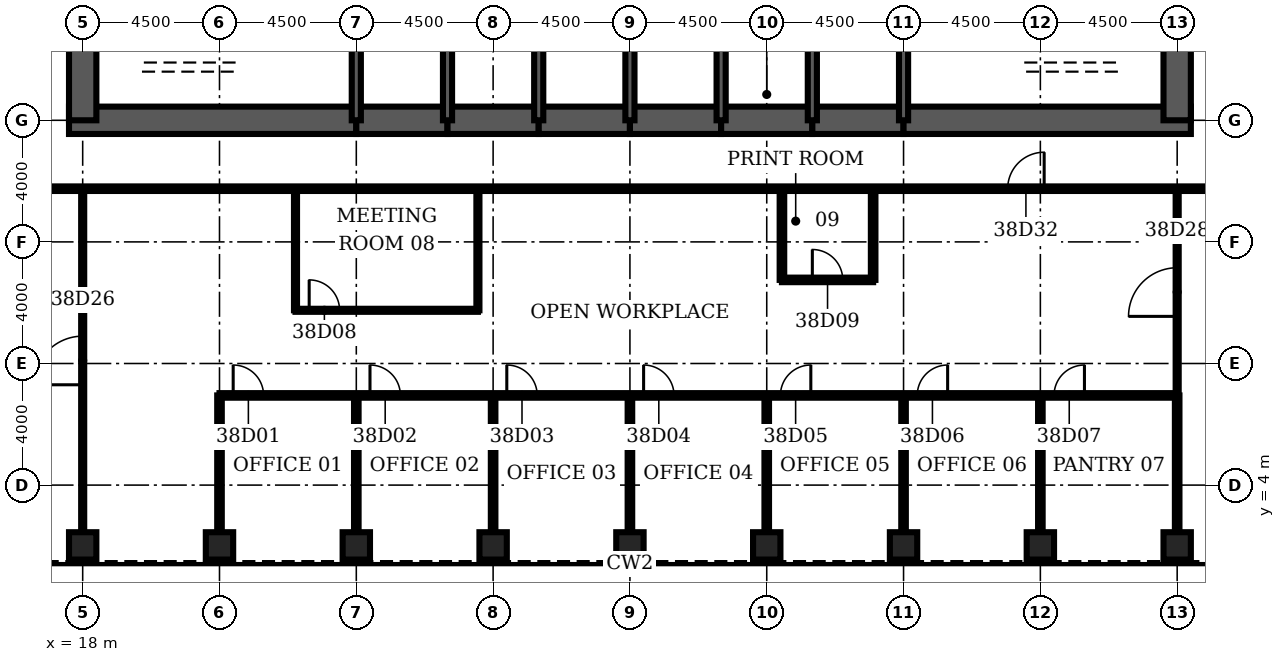
"""IFC4 building model, lengths in metres.
Left out: names, types, materials, properties, quantities, classifications, styles, units other than length and angle.
Written with IfcOpenShell. Run it as: python <this file> out.ifc"""

import sys

from ifc_helpers import new_model, si_unit, direction, frame, frame_2d, origin, origin_2d, place, context, subcontext, project, spatial, rectangle, hollow_rectangle, extrude, element, fill, save


model = new_model("IFC4")
c1 = context("Model", 3, precision=1e-05, world=origin(), true_north=direction((0.0, 1.0)))
c2 = subcontext(c1, "Body", "Model", "MODEL_VIEW")
j1 = project(units=[si_unit("LENGTHUNIT", "METRE"), si_unit("PLANEANGLEUNIT", "RADIAN")], contexts=[c1])
p1 = place(None, origin())
s1 = spatial("IfcSite", under=j1, at=p1, CompositionType="ELEMENT")
p2 = place(p1, origin())
s2 = spatial("IfcBuilding", under=s1, at=p2, CompositionType="ELEMENT")
p3 = place(p2, frame((0.0, 0.0, 171.9)))
s3 = spatial("IfcBuildingStorey", under=s2, at=p3, CompositionType="ELEMENT", Elevation=171.9)
for number, where, z_axis, x_axis in (
    (1, (18.0, 2.0, 0.0), (0.0, 0.0, 1.0), (0.0, 1.0, 0.0)),
    (2, (22.5, 2.0, 0.0), (0.0, 0.0, 1.0), (0.0, 1.0, 0.0)),
    (3, (27.0, 2.0, 0.0), (0.0, 0.0, 1.0), (0.0, 1.0, 0.0)),
    (4, (31.5, 2.0, 0.0), (0.0, 0.0, 1.0), (0.0, 1.0, 0.0)),
    (5, (36.0, 2.0, 0.0), (0.0, 0.0, 1.0), (0.0, 1.0, 0.0)),
    (6, (40.5, 2.0, 0.0), (0.0, 0.0, 1.0), (0.0, 1.0, 0.0)),
    (7, (45.0, 2.0, 0.0), (0.0, 0.0, 1.0), (0.0, 1.0, 0.0)),
    (8, (49.5, 2.0, 0.0), (0.0, 0.0, 1.0), (0.0, 1.0, 0.0)),
    (9, (54.0, 2.0, 0.0), (0.0, 0.0, 1.0), (0.0, 1.0, 0.0)),
):
    element("IfcColumn", number, at=place(p3, frame(where, z_axis=z_axis, x_axis=x_axis)), inside=s3, PredefinedType="COLUMN", context=c2, shape_type="SweptSolid", body=[
        extrude(hollow_rectangle(XDim=0.9, YDim=0.9, WallThickness=0.09, at=origin_2d()), origin(), (0.0, 0.0, 1.0), 4.2),
    ])
p4 = place(p3, frame((17.55, 16.0, 0.0), z_axis=(0.0, 0.0, 1.0), x_axis=(1.0, 0.0, 0.0)))
e10 = element("IfcWall", 10, at=p4, inside=s3, PredefinedType="SHEAR", context=c2, shape_type="SweptSolid", body=[
    extrude(rectangle(XDim=9.45, YDim=0.9, at=frame_2d((4.725, 0.0))), origin(), (0.0, 0.0, 1.0), 4.2),
])
for number, where, z_axis, x_axis in (
    (11, (27.0, 16.0, 0.0), (0.0, 0.0, 1.0), (1.0, 0.0, 0.0)),
    (12, (30.0, 16.0, 0.0), (0.0, 0.0, 1.0), (1.0, 0.0, 0.0)),
    (13, (33.0, 16.0, 0.0), (0.0, 0.0, 1.0), (1.0, 0.0, 0.0)),
    (14, (36.0, 16.0, 0.0), (0.0, 0.0, 1.0), (1.0, 0.0, 0.0)),
    (15, (39.0, 16.0, 0.0), (0.0, 0.0, 1.0), (1.0, 0.0, 0.0)),
    (16, (42.0, 16.0, 0.0), (0.0, 0.0, 1.0), (1.0, 0.0, 0.0)),
):
    element("IfcWall", number, at=place(p3, frame(where, z_axis=z_axis, x_axis=x_axis)), inside=s3, PredefinedType="SHEAR", context=c2, shape_type="SweptSolid", body=[
        extrude(rectangle(XDim=3.0, YDim=0.9, at=frame_2d((1.5, 0.0))), origin(), (0.0, 0.0, 1.0), 4.2),
    ])
p5 = place(p3, frame((45.0, 16.0, 0.0), z_axis=(0.0, 0.0, 1.0), x_axis=(1.0, 0.0, 0.0)))
e17 = element("IfcWall", 17, at=p5, inside=s3, PredefinedType="SHEAR", context=c2, shape_type="SweptSolid", body=[
    extrude(rectangle(XDim=9.45, YDim=0.9, at=frame_2d((4.725, 0.0))), origin(), (0.0, 0.0, 1.0), 4.2),
])
for number, where, z_axis, x_axis in (
    (18, (18.0, 19.2, 0.0), (0.0, 0.0, 1.0), (0.0, -1.0, 0.0)),
    (19, (54.0, 16.0, 0.0), (0.0, 0.0, 1.0), (0.0, 1.0, 0.0)),
):
    element("IfcWall", number, at=place(p3, frame(where, z_axis=z_axis, x_axis=x_axis)), inside=s3, PredefinedType="SHEAR", context=c2, shape_type="SweptSolid", body=[
        extrude(rectangle(XDim=3.2, YDim=0.9, at=frame_2d((1.6, 0.0))), origin(), (0.0, 0.0, 1.0), 4.2),
    ])
for number, where, z_axis, x_axis in (
    (20, (27.0, 16.0, 0.0), (0.0, 0.0, 1.0), (0.0, 1.0, 0.0)),
    (21, (30.0, 16.0, 0.0), (0.0, 0.0, 1.0), (0.0, 1.0, 0.0)),
    (22, (33.0, 16.0, 0.0), (0.0, 0.0, 1.0), (0.0, 1.0, 0.0)),
    (23, (36.0, 16.0, 0.0), (0.0, 0.0, 1.0), (0.0, 1.0, 0.0)),
    (24, (39.0, 16.0, 0.0), (0.0, 0.0, 1.0), (0.0, 1.0, 0.0)),
    (25, (42.0, 16.0, 0.0), (0.0, 0.0, 1.0), (0.0, 1.0, 0.0)),
    (26, (45.0, 16.0, 0.0), (0.0, 0.0, 1.0), (0.0, 1.0, 0.0)),
):
    element("IfcWall", number, at=place(p3, frame(where, z_axis=z_axis, x_axis=x_axis)), inside=s3, PredefinedType="SOLIDWALL", context=c2, shape_type="SweptSolid", body=[
        extrude(rectangle(XDim=3.2, YDim=0.3, at=frame_2d((1.6, 0.0))), origin(), (0.0, 0.0, 1.0), 4.2),
    ])
p6 = place(p3, frame((39.15, 17.4, 0.0), z_axis=(0.0, 0.0, 1.0), x_axis=(1.0, 0.0, 0.0)))
e27 = element("IfcWall", 27, at=p6, inside=s3, PredefinedType="SOLIDWALL", context=c2, shape_type="SweptSolid", body=[
    extrude(rectangle(XDim=2.7, YDim=0.3, at=frame_2d((1.35, 0.0))), origin(), (0.0, 0.0, 1.0), 4.04),
])
p7 = place(p6, frame((0.85, 0.0, 0.0)))
e28 = element("IfcOpeningElement", 28, at=p7, cuts=e27, PredefinedType="OPENING", context=c2, shape_type="SweptSolid", body=[
    extrude(rectangle(XDim=1.0, YDim=2.1, at=frame_2d((0.5, 1.05))), frame((0.0, 0.16, 0.0), z_axis=(0.0, -1.0, 0.0), x_axis=(1.0, 0.0, 0.0)), (0.0, 0.0, 1.0), 0.32),
])
p8 = place(p3, frame((22.5, 6.95, 0.0), z_axis=(0.0, 0.0, 1.0), x_axis=(1.0, 0.0, 0.0)))
e29 = element("IfcWall", 29, at=p8, inside=s3, PredefinedType="PARTITIONING", context=c2, shape_type="SweptSolid", body=[
    extrude(rectangle(XDim=31.5, YDim=0.15, at=frame_2d((15.75, 0.0))), origin(), (0.0, 0.0, 1.0), 3.0),
])
p9 = place(p8, frame((0.45, 0.0, 0.0)))
e30 = element("IfcOpeningElement", 30, at=p9, cuts=e29, PredefinedType="OPENING", context=c2, shape_type="SweptSolid", body=[
    extrude(rectangle(XDim=1.0, YDim=2.1, at=frame_2d((0.5, 1.05))), frame((0.0, 0.085, 0.0), z_axis=(0.0, -1.0, 0.0), x_axis=(1.0, 0.0, 0.0)), (0.0, 0.0, 1.0), 0.17),
])
p10 = place(p8, frame((4.95, 0.0, 0.0)))
e31 = element("IfcOpeningElement", 31, at=p10, cuts=e29, PredefinedType="OPENING", context=c2, shape_type="SweptSolid", body=[
    extrude(rectangle(XDim=1.0, YDim=2.1, at=frame_2d((0.5, 1.05))), frame((0.0, 0.085, 0.0), z_axis=(0.0, -1.0, 0.0), x_axis=(1.0, 0.0, 0.0)), (0.0, 0.0, 1.0), 0.17),
])
p11 = place(p8, frame((9.45, 0.0, 0.0)))
e32 = element("IfcOpeningElement", 32, at=p11, cuts=e29, PredefinedType="OPENING", context=c2, shape_type="SweptSolid", body=[
    extrude(rectangle(XDim=1.0, YDim=2.1, at=frame_2d((0.5, 1.05))), frame((0.0, 0.085, 0.0), z_axis=(0.0, -1.0, 0.0), x_axis=(1.0, 0.0, 0.0)), (0.0, 0.0, 1.0), 0.17),
])
p12 = place(p8, frame((13.95, 0.0, 0.0)))
e33 = element("IfcOpeningElement", 33, at=p12, cuts=e29, PredefinedType="OPENING", context=c2, shape_type="SweptSolid", body=[
    extrude(rectangle(XDim=1.0, YDim=2.1, at=frame_2d((0.5, 1.05))), frame((0.0, 0.085, 0.0), z_axis=(0.0, -1.0, 0.0), x_axis=(1.0, 0.0, 0.0)), (0.0, 0.0, 1.0), 0.17),
])
p13 = place(p8, frame((18.45, 0.0, 0.0)))
e34 = element("IfcOpeningElement", 34, at=p13, cuts=e29, PredefinedType="OPENING", context=c2, shape_type="SweptSolid", body=[
    extrude(rectangle(XDim=1.0, YDim=2.1, at=frame_2d((0.5, 1.05))), frame((0.0, 0.085, 0.0), z_axis=(0.0, -1.0, 0.0), x_axis=(1.0, 0.0, 0.0)), (0.0, 0.0, 1.0), 0.17),
])
p14 = place(p8, frame((22.95, 0.0, 0.0)))
e35 = element("IfcOpeningElement", 35, at=p14, cuts=e29, PredefinedType="OPENING", context=c2, shape_type="SweptSolid", body=[
    extrude(rectangle(XDim=1.0, YDim=2.1, at=frame_2d((0.5, 1.05))), frame((0.0, 0.085, 0.0), z_axis=(0.0, -1.0, 0.0), x_axis=(1.0, 0.0, 0.0)), (0.0, 0.0, 1.0), 0.17),
])
p15 = place(p8, frame((27.45, 0.0, 0.0)))
e36 = element("IfcOpeningElement", 36, at=p15, cuts=e29, PredefinedType="OPENING", context=c2, shape_type="SweptSolid", body=[
    extrude(rectangle(XDim=1.0, YDim=2.1, at=frame_2d((0.5, 1.05))), frame((0.0, 0.085, 0.0), z_axis=(0.0, -1.0, 0.0), x_axis=(1.0, 0.0, 0.0)), (0.0, 0.0, 1.0), 0.17),
])
p16 = place(p3, frame((25.0, 9.75, 0.0), z_axis=(0.0, 0.0, 1.0), x_axis=(1.0, 0.0, 0.0)))
e37 = element("IfcWall", 37, at=p16, inside=s3, PredefinedType="PARTITIONING", context=c2, shape_type="SweptSolid", body=[
    extrude(rectangle(XDim=6.0, YDim=0.1, at=frame_2d((3.0, 0.0))), origin(), (0.0, 0.0, 1.0), 3.0),
])
p17 = place(p16, frame((0.45, 0.0, 0.0)))
e38 = element("IfcOpeningElement", 38, at=p17, cuts=e37, PredefinedType="OPENING", context=c2, shape_type="SweptSolid", body=[
    extrude(rectangle(XDim=1.0, YDim=2.1, at=frame_2d((0.5, 1.05))), frame((0.0, 0.06, 0.0), z_axis=(0.0, -1.0, 0.0), x_axis=(1.0, 0.0, 0.0)), (0.0, 0.0, 1.0), 0.12),
])
p18 = place(p3, frame((41.0, 10.75, 0.0), z_axis=(0.0, 0.0, 1.0), x_axis=(1.0, 0.0, 0.0)))
e39 = element("IfcWall", 39, at=p18, inside=s3, PredefinedType="PARTITIONING", context=c2, shape_type="SweptSolid", body=[
    extrude(rectangle(XDim=3.0, YDim=0.15, at=frame_2d((1.5, 0.0))), origin(), (0.0, 0.0, 1.0), 3.0),
])
p19 = place(p18, frame((1.0, 0.0, 0.0)))
e40 = element("IfcOpeningElement", 40, at=p19, cuts=e39, PredefinedType="OPENING", context=c2, shape_type="SweptSolid", body=[
    extrude(rectangle(XDim=1.0, YDim=2.1, at=frame_2d((0.5, 1.05))), frame((0.0, 0.085, 0.0), z_axis=(0.0, -1.0, 0.0), x_axis=(1.0, 0.0, 0.0)), (0.0, 0.0, 1.0), 0.17),
])
p20 = place(p3, frame((15.15, 13.75, 0.0), z_axis=(0.0, 0.0, 1.0), x_axis=(1.0, 0.0, 0.0)))
e41 = element("IfcWall", 41, at=p20, inside=s3, PredefinedType="PARTITIONING", context=c2, shape_type="SweptSolid", body=[
    extrude(rectangle(XDim=41.7, YDim=0.15, at=frame_2d((20.85, 0.0))), origin(), (0.0, 0.0, 1.0), 3.0),
])
p21 = place(p20, frame((33.275, 0.0, 0.0)))
e42 = element("IfcOpeningElement", 42, at=p21, cuts=e41, PredefinedType="OPENING", context=c2, shape_type="SweptSolid", body=[
    extrude(rectangle(XDim=1.2, YDim=2.1, at=frame_2d((0.6, 1.05))), frame((0.0, 0.085, 0.0), z_axis=(0.0, -1.0, 0.0), x_axis=(1.0, 0.0, 0.0)), (0.0, 0.0, 1.0), 0.17),
])
p22 = place(p3, frame((18.0, 2.45, 0.0), z_axis=(0.0, 0.0, 1.0), x_axis=(0.0, 1.0, 0.0)))
e43 = element("IfcWall", 43, at=p22, inside=s3, PredefinedType="PARTITIONING", context=c2, shape_type="SweptSolid", body=[
    extrude(rectangle(XDim=11.3, YDim=0.1, at=frame_2d((5.65, 0.0))), origin(), (0.0, 0.0, 1.0), 3.0),
])
p23 = place(p22, frame((4.85, 0.0, 0.0)))
e44 = element("IfcOpeningElement", 44, at=p23, cuts=e43, PredefinedType="OPENING", context=c2, shape_type="SweptSolid", body=[
    extrude(rectangle(XDim=1.6, YDim=2.1, at=frame_2d((0.8, 1.05))), frame((0.0, 0.06, 0.0), z_axis=(0.0, -1.0, 0.0), x_axis=(1.0, 0.0, 0.0)), (0.0, 0.0, 1.0), 0.12),
])
p24 = place(p3, frame((22.5, 2.45, 0.0), z_axis=(0.0, 0.0, 1.0), x_axis=(0.0, 1.0, 0.0)))
e45 = element("IfcWall", 45, at=p24, inside=s3, PredefinedType="PARTITIONING", context=c2, shape_type="SweptSolid", body=[
    extrude(rectangle(XDim=4.5, YDim=0.15, at=frame_2d((2.25, 0.0))), origin(), (0.0, 0.0, 1.0), 3.0),
])
p25 = place(p3, frame((25.0, 9.75, 0.0), z_axis=(0.0, 0.0, 1.0), x_axis=(0.0, 1.0, 0.0)))
e46 = element("IfcWall", 46, at=p25, inside=s3, PredefinedType="PARTITIONING", context=c2, shape_type="SweptSolid", body=[
    extrude(rectangle(XDim=4.0, YDim=0.1, at=frame_2d((2.0, 0.0))), origin(), (0.0, 0.0, 1.0), 3.0),
])
p26 = place(p3, frame((27.0, 2.45, 0.0), z_axis=(0.0, 0.0, 1.0), x_axis=(0.0, 1.0, 0.0)))
e47 = element("IfcWall", 47, at=p26, inside=s3, PredefinedType="PARTITIONING", context=c2, shape_type="SweptSolid", body=[
    extrude(rectangle(XDim=4.5, YDim=0.15, at=frame_2d((2.25, 0.0))), origin(), (0.0, 0.0, 1.0), 3.0),
])
p27 = place(p3, frame((31.0, 9.75, 0.0), z_axis=(0.0, 0.0, 1.0), x_axis=(0.0, 1.0, 0.0)))
e48 = element("IfcWall", 48, at=p27, inside=s3, PredefinedType="PARTITIONING", context=c2, shape_type="SweptSolid", body=[
    extrude(rectangle(XDim=4.0, YDim=0.1, at=frame_2d((2.0, 0.0))), origin(), (0.0, 0.0, 1.0), 3.0),
])
for number, where, z_axis, x_axis in (
    (49, (31.5, 2.45, 0.0), (0.0, 0.0, 1.0), (0.0, 1.0, 0.0)),
    (50, (36.0, 2.45, 0.0), (0.0, 0.0, 1.0), (0.0, 1.0, 0.0)),
    (51, (40.5, 2.45, 0.0), (0.0, 0.0, 1.0), (0.0, 1.0, 0.0)),
):
    element("IfcWall", number, at=place(p3, frame(where, z_axis=z_axis, x_axis=x_axis)), inside=s3, PredefinedType="PARTITIONING", context=c2, shape_type="SweptSolid", body=[
        extrude(rectangle(XDim=4.5, YDim=0.15, at=frame_2d((2.25, 0.0))), origin(), (0.0, 0.0, 1.0), 3.0),
    ])
for number, where, z_axis, x_axis in (
    (52, (41.0, 10.75, 0.0), (0.0, 0.0, 1.0), (0.0, 1.0, 0.0)),
    (53, (44.0, 10.75, 0.0), (0.0, 0.0, 1.0), (0.0, 1.0, 0.0)),
):
    element("IfcWall", number, at=place(p3, frame(where, z_axis=z_axis, x_axis=x_axis)), inside=s3, PredefinedType="PARTITIONING", context=c2, shape_type="SweptSolid", body=[
        extrude(rectangle(XDim=3.0, YDim=0.15, at=frame_2d((1.5, 0.0))), origin(), (0.0, 0.0, 1.0), 3.0),
    ])
for number, where, z_axis, x_axis in (
    (54, (45.0, 2.45, 0.0), (0.0, 0.0, 1.0), (0.0, 1.0, 0.0)),
    (55, (49.5, 2.45, 0.0), (0.0, 0.0, 1.0), (0.0, 1.0, 0.0)),
    (56, (54.0, 2.45, 0.0), (0.0, 0.0, 1.0), (0.0, 1.0, 0.0)),
):
    element("IfcWall", number, at=place(p3, frame(where, z_axis=z_axis, x_axis=x_axis)), inside=s3, PredefinedType="PARTITIONING", context=c2, shape_type="SweptSolid", body=[
        extrude(rectangle(XDim=4.5, YDim=0.15, at=frame_2d((2.25, 0.0))), origin(), (0.0, 0.0, 1.0), 3.0),
    ])
p28 = place(p3, frame((54.0, 6.95, 0.0), z_axis=(0.0, 0.0, 1.0), x_axis=(0.0, 1.0, 0.0)))
e57 = element("IfcWall", 57, at=p28, inside=s3, PredefinedType="PARTITIONING", context=c2, shape_type="SweptSolid", body=[
    extrude(rectangle(XDim=6.8, YDim=0.1, at=frame_2d((3.4, 0.0))), origin(), (0.0, 0.0, 1.0), 3.0),
])
p29 = place(p28, frame((2.6, 0.0, 0.0)))
e58 = element("IfcOpeningElement", 58, at=p29, cuts=e57, PredefinedType="OPENING", context=c2, shape_type="SweptSolid", body=[
    extrude(rectangle(XDim=1.6, YDim=2.1, at=frame_2d((0.8, 1.05))), frame((0.0, 0.06, 0.0), z_axis=(0.0, -1.0, 0.0), x_axis=(1.0, 0.0, 0.0)), (0.0, 0.0, 1.0), 0.12),
])
p30 = place(p7, origin())
e59 = element("IfcDoor", 59, at=p30, inside=s3, OperationType="SINGLE_SWING_LEFT", PredefinedType="DOOR", context=c2, shape_type="SweptSolid", body=[
    extrude(rectangle(XDim=1.0, YDim=2.1, at=frame_2d((0.5, 1.05))), frame((0.0, 0.025, 0.0), z_axis=(0.0, -1.0, 0.0), x_axis=(1.0, 0.0, 0.0)), (0.0, 0.0, 1.0), 0.05),
])
fill(e28, e59)
p31 = place(p9, origin())
e60 = element("IfcDoor", 60, at=p31, inside=s3, OperationType="SINGLE_SWING_LEFT", PredefinedType="DOOR", context=c2, shape_type="SweptSolid", body=[
    extrude(rectangle(XDim=1.0, YDim=2.1, at=frame_2d((0.5, 1.05))), frame((0.0, 0.025, 0.0), z_axis=(0.0, -1.0, 0.0), x_axis=(1.0, 0.0, 0.0)), (0.0, 0.0, 1.0), 0.05),
])
fill(e30, e60)
p32 = place(p10, origin())
e61 = element("IfcDoor", 61, at=p32, inside=s3, OperationType="SINGLE_SWING_LEFT", PredefinedType="DOOR", context=c2, shape_type="SweptSolid", body=[
    extrude(rectangle(XDim=1.0, YDim=2.1, at=frame_2d((0.5, 1.05))), frame((0.0, 0.025, 0.0), z_axis=(0.0, -1.0, 0.0), x_axis=(1.0, 0.0, 0.0)), (0.0, 0.0, 1.0), 0.05),
])
fill(e31, e61)
p33 = place(p11, origin())
e62 = element("IfcDoor", 62, at=p33, inside=s3, OperationType="SINGLE_SWING_LEFT", PredefinedType="DOOR", context=c2, shape_type="SweptSolid", body=[
    extrude(rectangle(XDim=1.0, YDim=2.1, at=frame_2d((0.5, 1.05))), frame((0.0, 0.025, 0.0), z_axis=(0.0, -1.0, 0.0), x_axis=(1.0, 0.0, 0.0)), (0.0, 0.0, 1.0), 0.05),
])
fill(e32, e62)
p34 = place(p12, origin())
e63 = element("IfcDoor", 63, at=p34, inside=s3, OperationType="SINGLE_SWING_LEFT", PredefinedType="DOOR", context=c2, shape_type="SweptSolid", body=[
    extrude(rectangle(XDim=1.0, YDim=2.1, at=frame_2d((0.5, 1.05))), frame((0.0, 0.025, 0.0), z_axis=(0.0, -1.0, 0.0), x_axis=(1.0, 0.0, 0.0)), (0.0, 0.0, 1.0), 0.05),
])
fill(e33, e63)
p35 = place(p13, origin())
e64 = element("IfcDoor", 64, at=p35, inside=s3, OperationType="SINGLE_SWING_RIGHT", PredefinedType="DOOR", context=c2, shape_type="SweptSolid", body=[
    extrude(rectangle(XDim=1.0, YDim=2.1, at=frame_2d((0.5, 1.05))), frame((0.0, 0.025, 0.0), z_axis=(0.0, -1.0, 0.0), x_axis=(1.0, 0.0, 0.0)), (0.0, 0.0, 1.0), 0.05),
])
fill(e34, e64)
p36 = place(p14, origin())
e65 = element("IfcDoor", 65, at=p36, inside=s3, OperationType="SINGLE_SWING_RIGHT", PredefinedType="DOOR", context=c2, shape_type="SweptSolid", body=[
    extrude(rectangle(XDim=1.0, YDim=2.1, at=frame_2d((0.5, 1.05))), frame((0.0, 0.025, 0.0), z_axis=(0.0, -1.0, 0.0), x_axis=(1.0, 0.0, 0.0)), (0.0, 0.0, 1.0), 0.05),
])
fill(e35, e65)
p37 = place(p15, origin())
e66 = element("IfcDoor", 66, at=p37, inside=s3, OperationType="SINGLE_SWING_RIGHT", PredefinedType="DOOR", context=c2, shape_type="SweptSolid", body=[
    extrude(rectangle(XDim=1.0, YDim=2.1, at=frame_2d((0.5, 1.05))), frame((0.0, 0.025, 0.0), z_axis=(0.0, -1.0, 0.0), x_axis=(1.0, 0.0, 0.0)), (0.0, 0.0, 1.0), 0.05),
])
fill(e36, e66)
p38 = place(p17, origin())
e67 = element("IfcDoor", 67, at=p38, inside=s3, OperationType="SINGLE_SWING_LEFT", PredefinedType="DOOR", context=c2, shape_type="SweptSolid", body=[
    extrude(rectangle(XDim=1.0, YDim=2.1, at=frame_2d((0.5, 1.05))), frame((0.0, 0.025, 0.0), z_axis=(0.0, -1.0, 0.0), x_axis=(1.0, 0.0, 0.0)), (0.0, 0.0, 1.0), 0.05),
])
fill(e38, e67)
p39 = place(p19, origin())
e68 = element("IfcDoor", 68, at=p39, inside=s3, OperationType="SINGLE_SWING_LEFT", PredefinedType="DOOR", context=c2, shape_type="SweptSolid", body=[
    extrude(rectangle(XDim=1.0, YDim=2.1, at=frame_2d((0.5, 1.05))), frame((0.0, 0.025, 0.0), z_axis=(0.0, -1.0, 0.0), x_axis=(1.0, 0.0, 0.0)), (0.0, 0.0, 1.0), 0.05),
])
fill(e40, e68)
p40 = place(p23, origin())
e69 = element("IfcDoor", 69, at=p40, inside=s3, OperationType="SINGLE_SWING_LEFT", PredefinedType="DOOR", context=c2, shape_type="SweptSolid", body=[
    extrude(rectangle(XDim=1.6, YDim=2.1, at=frame_2d((0.8, 1.05))), frame((0.0, 0.025, 0.0), z_axis=(0.0, -1.0, 0.0), x_axis=(1.0, 0.0, 0.0)), (0.0, 0.0, 1.0), 0.05),
])
fill(e44, e69)
p41 = place(p29, origin())
e70 = element("IfcDoor", 70, at=p41, inside=s3, OperationType="SINGLE_SWING_LEFT", PredefinedType="DOOR", context=c2, shape_type="SweptSolid", body=[
    extrude(rectangle(XDim=1.6, YDim=2.1, at=frame_2d((0.8, 1.05))), frame((0.0, 0.025, 0.0), z_axis=(0.0, -1.0, 0.0), x_axis=(1.0, 0.0, 0.0)), (0.0, 0.0, 1.0), 0.05),
])
fill(e58, e70)
p42 = place(p21, origin())
e71 = element("IfcDoor", 71, at=p42, inside=s3, OperationType="SINGLE_SWING_RIGHT", PredefinedType="DOOR", context=c2, shape_type="SweptSolid", body=[
    extrude(rectangle(XDim=1.2, YDim=2.1, at=frame_2d((0.6, 1.05))), frame((0.0, 0.025, 0.0), z_axis=(0.0, -1.0, 0.0), x_axis=(1.0, 0.0, 0.0)), (0.0, 0.0, 1.0), 0.05),
])
fill(e42, e71)
save(model, sys.argv[1])
